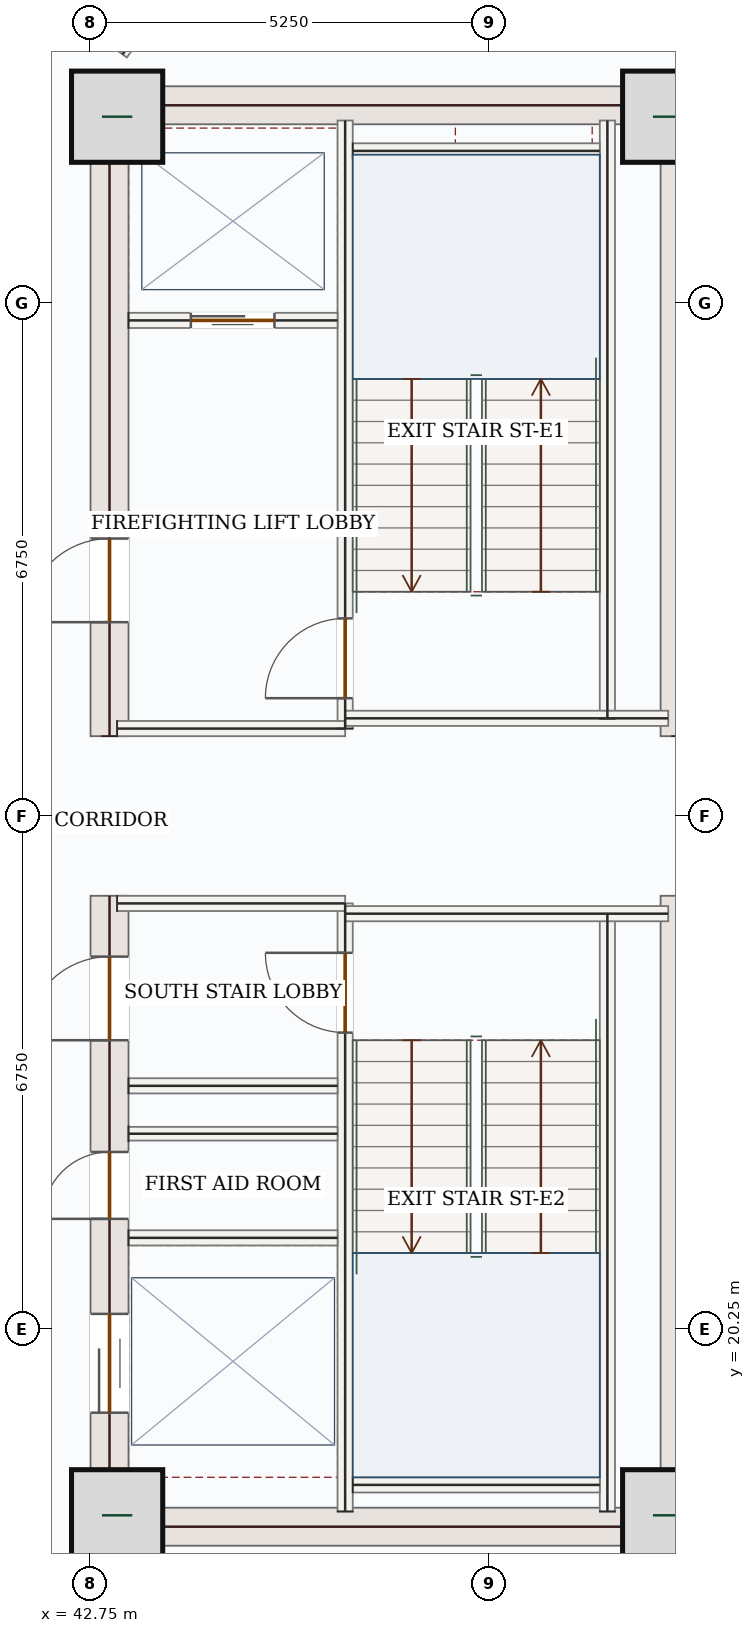
"""IFC4 building model, lengths in metres.
Left out: names, types, materials, properties, quantities, classifications, styles, units other than length and angle.
Written with IfcOpenShell. Run it as: python <this file> out.ifc"""

import sys

from ifc_helpers import new_model, si_unit, direction, frame, frame_2d, origin, origin_2d, place, context, subcontext, project, spatial, rectangle, extrude, source, transform, mapped, element, fill, save


model = new_model("IFC4")
c1 = context("Model", 3, precision=1e-05, world=origin(), true_north=direction((0.0, 1.0)))
c2 = subcontext(c1, "Body", "Model", "MODEL_VIEW")
j1 = project(units=[si_unit("LENGTHUNIT", "METRE"), si_unit("PLANEANGLEUNIT", "RADIAN")], contexts=[c1])
p1 = place(None, origin())
s1 = spatial("IfcSite", under=j1, at=p1, CompositionType="ELEMENT")
p2 = place(p1, origin())
s2 = spatial("IfcBuilding", under=s1, at=p2, CompositionType="ELEMENT")
p3 = place(p2, frame((0.0, 0.0, 143.4)))
s3 = spatial("IfcBuildingStorey", under=s2, at=p3, CompositionType="ELEMENT", Elevation=143.4)
p4 = place(p3, frame((43.0, 17.4, 0.0), z_axis=(0.0, 0.0, 1.0), x_axis=(0.0, 1.0, 0.0)))
e1 = element("IfcWall", 1, at=p4, inside=s3, PredefinedType="SHEAR", context=c2, shape_type="SweptSolid", body=[
    extrude(rectangle(XDim=8.55, YDim=0.5, at=frame_2d((4.275, 0.0))), origin(), (0.0, 0.0, 1.0), 3.62),
])
p5 = place(p4, frame((6.65, 0.0, 0.0)))
e2 = element("IfcOpeningElement", 2, at=p5, cuts=e1, PredefinedType="OPENING", context=c2, shape_type="SweptSolid", body=[
    extrude(rectangle(XDim=1.1, YDim=2.2, at=frame_2d((0.55, 1.1))), frame((0.0, 0.26, 0.0), z_axis=(0.0, -1.0, 0.0), x_axis=(1.0, 0.0, 0.0)), (0.0, 0.0, 1.0), 0.52),
])
p6 = place(p4, frame((1.75, 0.0, 0.0)))
e3 = element("IfcOpeningElement", 3, at=p6, cuts=e1, PredefinedType="OPENING", context=c2, shape_type="SweptSolid", body=[
    extrude(rectangle(XDim=1.3, YDim=2.2, at=frame_2d((0.65, 1.1))), frame((0.0, 0.26, 0.0), z_axis=(0.0, -1.0, 0.0), x_axis=(1.0, 0.0, 0.0)), (0.0, 0.0, 1.0), 0.52),
])
p7 = place(p4, frame((4.3, 0.0, 0.0)))
e4 = element("IfcOpeningElement", 4, at=p7, cuts=e1, PredefinedType="OPENING", context=c2, shape_type="SweptSolid", body=[
    extrude(rectangle(XDim=0.88, YDim=2.1, at=frame_2d((0.44, 1.05))), frame((0.0, 0.26, 0.0), z_axis=(0.0, -1.0, 0.0), x_axis=(1.0, 0.0, 0.0)), (0.0, 0.0, 1.0), 0.52),
])
p8 = place(p3, frame((43.0, 28.05, 0.0), z_axis=(0.0, 0.0, 1.0), x_axis=(0.0, 1.0, 0.0)))
e5 = element("IfcWall", 5, at=p8, inside=s3, PredefinedType="SHEAR", context=c2, shape_type="SweptSolid", body=[
    extrude(rectangle(XDim=8.55, YDim=0.5, at=frame_2d((4.275, 0.0))), origin(), (0.0, 0.0, 1.0), 3.62),
])
p9 = place(p8, frame((1.5, 0.0, 0.0)))
e6 = element("IfcOpeningElement", 6, at=p9, cuts=e5, PredefinedType="OPENING", context=c2, shape_type="SweptSolid", body=[
    extrude(rectangle(XDim=1.1, YDim=2.2, at=frame_2d((0.55, 1.1))), frame((0.0, 0.26, 0.0), z_axis=(0.0, -1.0, 0.0), x_axis=(1.0, 0.0, 0.0)), (0.0, 0.0, 1.0), 0.52),
])
m1 = source(origin(), c2, "Body", "SweptSolid", [
    extrude(rectangle(XDim=8.55, YDim=0.5, at=frame_2d((4.275, 0.0))), origin(), (0.0, 0.0, 1.0), 3.62),
])
for number, where, z_axis, x_axis in (
    (7, (50.5, 17.4, 0.0), (0.0, 0.0, 1.0), (0.0, 1.0, 0.0)),
    (8, (50.5, 28.05, 0.0), (0.0, 0.0, 1.0), (0.0, 1.0, 0.0)),
):
    element("IfcWall", number, at=place(p3, frame(where, z_axis=z_axis, x_axis=x_axis)), inside=s3, PredefinedType="SHEAR", context=c2, shape_type="MappedRepresentation", body=[
        mapped(m1, transform((0.0, 0.0, 0.0), x_axis=(1.0, 0.0, 0.0), y_axis=(0.0, 1.0, 0.0), z_axis=(0.0, 0.0, 1.0), scale=1.0)),
    ])
m2 = source(origin(), c2, "Body", "SweptSolid", [
    extrude(rectangle(XDim=7.0, YDim=0.5, at=frame_2d((3.5, 0.0))), origin(), (0.0, 0.0, 1.0), 3.62),
])
for number, where, z_axis, x_axis in (
    (9, (43.25, 17.65, 0.0), (0.0, 0.0, 1.0), (1.0, 0.0, 0.0)),
    (10, (43.25, 36.35, 0.0), (0.0, 0.0, 1.0), (1.0, 0.0, 0.0)),
):
    element("IfcWall", number, at=place(p3, frame(where, z_axis=z_axis, x_axis=x_axis)), inside=s3, PredefinedType="SHEAR", context=c2, shape_type="MappedRepresentation", body=[
        mapped(m2, transform((0.0, 0.0, 0.0), x_axis=(1.0, 0.0, 0.0), y_axis=(0.0, 1.0, 0.0), z_axis=(0.0, 0.0, 1.0), scale=1.0)),
    ])
m3 = source(origin(), c2, "Body", "SweptSolid", [
    extrude(rectangle(XDim=1.2, YDim=1.2, at=origin_2d()), origin(), (0.0, 0.0, 1.0), 3.9),
])
for number, where, z_axis, x_axis in (
    (11, (43.1, 17.8, 0.0), (0.0, 0.0, 1.0), (1.0, 0.0, 0.0)),
    (12, (50.35, 17.8, 0.0), (0.0, 0.0, 1.0), (1.0, 0.0, 0.0)),
    (13, (43.1, 36.2, 0.0), (0.0, 0.0, 1.0), (1.0, 0.0, 0.0)),
    (14, (50.35, 36.2, 0.0), (0.0, 0.0, 1.0), (1.0, 0.0, 0.0)),
):
    element("IfcColumn", number, at=place(p3, frame(where, z_axis=z_axis, x_axis=x_axis)), inside=s3, PredefinedType="COLUMN", context=c2, shape_type="MappedRepresentation", body=[
        mapped(m3, transform((0.0, 0.0, 0.0), x_axis=(1.0, 0.0, 0.0), y_axis=(0.0, 1.0, 0.0), z_axis=(0.0, 0.0, 1.0), scale=1.0)),
    ])
m4 = source(origin(), c2, "Body", "SweptSolid", [
    extrude(rectangle(XDim=5.258, YDim=0.28, at=frame_2d((2.629, 0.0))), origin(), (0.0, 0.0, 1.0), 3.62),
])
p10 = place(p3, frame((53.06, 18.458, 0.0), z_axis=(0.0, 0.0, 1.0), x_axis=(-0.707106781187, -0.707106781187, 0.0)))
e15 = element("IfcWall", 15, at=p10, inside=s3, PredefinedType="SOLIDWALL", context=c2, shape_type="MappedRepresentation", body=[
    mapped(m4, transform((0.0, 0.0, 0.0), x_axis=(1.0, 0.0, 0.0), y_axis=(0.0, 1.0, 0.0), z_axis=(0.0, 0.0, 1.0), scale=1.0)),
])
m5 = source(origin(), c2, "Body", "SweptSolid", [
    extrude(rectangle(XDim=3.967, YDim=0.28, at=frame_2d((1.984, 0.0))), origin(), (0.0, 0.0, 1.0), 3.62),
])
p11 = place(p3, frame((49.342, 39.26, 0.0), z_axis=(0.0, 0.0, 1.0), x_axis=(0.707076011326, -0.707137549708, 0.0)))
e16 = element("IfcWall", 16, at=p11, inside=s3, PredefinedType="SOLIDWALL", context=c2, shape_type="MappedRepresentation", body=[
    mapped(m5, transform((0.0, 0.0, 0.0), x_axis=(1.0, 0.0, 0.0), y_axis=(0.0, 1.0, 0.0), z_axis=(0.0, 0.0, 1.0), scale=1.0)),
])
m6 = source(origin(), c2, "Body", "SweptSolid", [
    extrude(rectangle(XDim=7.87, YDim=0.2, at=frame_2d((3.935, 0.0))), origin(), (0.0, 0.0, 1.0), 3.62),
])
for number, where, z_axis, x_axis in (
    (17, (49.55, 17.85, 0.0), (0.0, 0.0, 1.0), (0.0, 1.0, 0.0)),
    (18, (49.55, 28.28, 0.0), (0.0, 0.0, 1.0), (0.0, 1.0, 0.0)),
):
    element("IfcWall", number, at=place(p3, frame(where, z_axis=z_axis, x_axis=x_axis)), inside=s3, PredefinedType="SOLIDWALL", context=c2, shape_type="MappedRepresentation", body=[
        mapped(m6, transform((0.0, 0.0, 0.0), x_axis=(1.0, 0.0, 0.0), y_axis=(0.0, 1.0, 0.0), z_axis=(0.0, 0.0, 1.0), scale=1.0)),
    ])
p12 = place(p3, frame((46.1, 17.85, 0.0), z_axis=(0.0, 0.0, 1.0), x_axis=(0.0, 1.0, 0.0)))
e19 = element("IfcWall", 19, at=p12, inside=s3, PredefinedType="SOLIDWALL", context=c2, shape_type="SweptSolid", body=[
    extrude(rectangle(XDim=8.0, YDim=0.2, at=frame_2d((4.0, 0.0))), origin(), (0.0, 0.0, 1.0), 3.62),
])
p13 = place(p12, frame((6.3, 0.0, 0.0)))
e20 = element("IfcOpeningElement", 20, at=p13, cuts=e19, PredefinedType="OPENING", context=c2, shape_type="SweptSolid", body=[
    extrude(rectangle(XDim=1.05, YDim=2.15, at=frame_2d((0.525, 1.075))), frame((0.0, 0.11, 0.0), z_axis=(0.0, -1.0, 0.0), x_axis=(1.0, 0.0, 0.0)), (0.0, 0.0, 1.0), 0.22),
])
p14 = place(p3, frame((46.1, 28.15, 0.0), z_axis=(0.0, 0.0, 1.0), x_axis=(0.0, 1.0, 0.0)))
e21 = element("IfcWall", 21, at=p14, inside=s3, PredefinedType="SOLIDWALL", context=c2, shape_type="SweptSolid", body=[
    extrude(rectangle(XDim=8.0, YDim=0.2, at=frame_2d((4.0, 0.0))), origin(), (0.0, 0.0, 1.0), 3.62),
])
p15 = place(p14, frame((0.4, 0.0, 0.0)))
e22 = element("IfcOpeningElement", 22, at=p15, cuts=e21, PredefinedType="OPENING", context=c2, shape_type="SweptSolid", body=[
    extrude(rectangle(XDim=1.05, YDim=2.15, at=frame_2d((0.525, 1.075))), frame((0.0, 0.11, 0.0), z_axis=(0.0, -1.0, 0.0), x_axis=(1.0, 0.0, 0.0)), (0.0, 0.0, 1.0), 0.22),
])
m7 = source(origin(), c2, "Body", "SweptSolid", [
    extrude(rectangle(XDim=3.0, YDim=0.2, at=frame_2d((1.5, 0.0))), origin(), (0.0, 0.0, 1.0), 3.62),
])
p16 = place(p3, frame((43.1, 25.85, 0.0), z_axis=(0.0, 0.0, 1.0), x_axis=(1.0, 0.0, 0.0)))
e23 = element("IfcWall", 23, at=p16, inside=s3, PredefinedType="SOLIDWALL", context=c2, shape_type="MappedRepresentation", body=[
    mapped(m7, transform((0.0, 0.0, 0.0), x_axis=(1.0, 0.0, 0.0), y_axis=(0.0, 1.0, 0.0), z_axis=(0.0, 0.0, 1.0), scale=1.0)),
])
m8 = source(origin(), c2, "Body", "SweptSolid", [
    extrude(rectangle(XDim=4.25, YDim=0.2, at=frame_2d((2.125, 0.0))), origin(), (0.0, 0.0, 1.0), 3.62),
])
p17 = place(p3, frame((46.1, 25.715, 0.0), z_axis=(0.0, 0.0, 1.0), x_axis=(1.0, 0.0, 0.0)))
e24 = element("IfcWall", 24, at=p17, inside=s3, PredefinedType="SOLIDWALL", context=c2, shape_type="MappedRepresentation", body=[
    mapped(m8, transform((0.0, 0.0, 0.0), x_axis=(1.0, 0.0, 0.0), y_axis=(0.0, 1.0, 0.0), z_axis=(0.0, 0.0, 1.0), scale=1.0)),
])
p18 = place(p3, frame((43.1, 28.15, 0.0), z_axis=(0.0, 0.0, 1.0), x_axis=(1.0, 0.0, 0.0)))
e25 = element("IfcWall", 25, at=p18, inside=s3, PredefinedType="SOLIDWALL", context=c2, shape_type="MappedRepresentation", body=[
    mapped(m7, transform((0.0, 0.0, 0.0), x_axis=(1.0, 0.0, 0.0), y_axis=(0.0, 1.0, 0.0), z_axis=(0.0, 0.0, 1.0), scale=1.0)),
])
p19 = place(p3, frame((46.1, 28.285, 0.0), z_axis=(0.0, 0.0, 1.0), x_axis=(1.0, 0.0, 0.0)))
e26 = element("IfcWall", 26, at=p19, inside=s3, PredefinedType="SOLIDWALL", context=c2, shape_type="MappedRepresentation", body=[
    mapped(m8, transform((0.0, 0.0, 0.0), x_axis=(1.0, 0.0, 0.0), y_axis=(0.0, 1.0, 0.0), z_axis=(0.0, 0.0, 1.0), scale=1.0)),
])
m9 = source(origin(), c2, "Body", "SweptSolid", [
    extrude(rectangle(XDim=3.25, YDim=0.2, at=frame_2d((1.625, 0.0))), origin(), (0.0, 0.0, 1.0), 3.62),
])
for number, where, z_axis, x_axis in (
    (27, (46.2, 35.75, 0.0), (0.0, 0.0, 1.0), (1.0, 0.0, 0.0)),
    (28, (46.2, 18.2, 0.0), (0.0, 0.0, 1.0), (1.0, 0.0, 0.0)),
):
    element("IfcWall", number, at=place(p3, frame(where, z_axis=z_axis, x_axis=x_axis)), inside=s3, PredefinedType="SOLIDWALL", context=c2, shape_type="MappedRepresentation", body=[
        mapped(m9, transform((0.0, 0.0, 0.0), x_axis=(1.0, 0.0, 0.0), y_axis=(0.0, 1.0, 0.0), z_axis=(0.0, 0.0, 1.0), scale=1.0)),
    ])
p20 = place(p3, frame((43.25, 33.52, 0.0), z_axis=(0.0, 0.0, 1.0), x_axis=(1.0, 0.0, 0.0)))
e29 = element("IfcWall", 29, at=p20, inside=s3, PredefinedType="SOLIDWALL", context=c2, shape_type="SweptSolid", body=[
    extrude(rectangle(XDim=2.75, YDim=0.2, at=frame_2d((1.375, 0.0))), origin(), (0.0, 0.0, 1.0), 3.62),
])
p21 = place(p20, frame((0.82, 0.0, 0.0)))
e30 = element("IfcOpeningElement", 30, at=p21, cuts=e29, PredefinedType="OPENING", context=c2, shape_type="SweptSolid", body=[
    extrude(rectangle(XDim=1.1, YDim=2.15, at=frame_2d((0.55, 1.075))), frame((0.0, 0.11, 0.0), z_axis=(0.0, -1.0, 0.0), x_axis=(1.0, 0.0, 0.0)), (0.0, 0.0, 1.0), 0.22),
])
m10 = source(origin(), c2, "Body", "SweptSolid", [
    extrude(rectangle(XDim=2.75, YDim=0.2, at=frame_2d((1.375, 0.0))), origin(), (0.0, 0.0, 1.0), 3.62),
])
for number, where, z_axis, x_axis in (
    (31, (43.25, 23.45, 0.0), (0.0, 0.0, 1.0), (1.0, 0.0, 0.0)),
    (32, (43.25, 21.45, 0.0), (0.0, 0.0, 1.0), (1.0, 0.0, 0.0)),
):
    element("IfcWall", number, at=place(p3, frame(where, z_axis=z_axis, x_axis=x_axis)), inside=s3, PredefinedType="SOLIDWALL", context=c2, shape_type="MappedRepresentation", body=[
        mapped(m10, transform((0.0, 0.0, 0.0), x_axis=(1.0, 0.0, 0.0), y_axis=(0.0, 1.0, 0.0), z_axis=(0.0, 0.0, 1.0), scale=1.0)),
    ])
m11 = source(origin(), c2, "Body", "SweptSolid", [
    extrude(rectangle(XDim=2.75, YDim=0.18, at=frame_2d((1.375, 0.0))), origin(), (0.0, 0.0, 1.0), 3.62),
])
p22 = place(p3, frame((43.25, 22.82, 0.0), z_axis=(0.0, 0.0, 1.0), x_axis=(1.0, 0.0, 0.0)))
e33 = element("IfcWall", 33, at=p22, inside=s3, PredefinedType="PARTITIONING", context=c2, shape_type="MappedRepresentation", body=[
    mapped(m11, transform((0.0, 0.0, 0.0), x_axis=(1.0, 0.0, 0.0), y_axis=(0.0, 1.0, 0.0), z_axis=(0.0, 0.0, 1.0), scale=1.0)),
])
m12 = source(origin(), c2, "Body", "SweptSolid", [
    extrude(rectangle(XDim=2.582, YDim=0.14, at=frame_2d((1.291, 0.0))), origin(), (0.0, 0.0, 1.0), 3.62),
])
p23 = place(p3, frame((44.68, 39.115, 0.0), z_axis=(0.0, 0.0, 1.0), x_axis=(-0.584533864389, -0.811369312572, 0.0)))
e34 = element("IfcWall", 34, at=p23, inside=s3, PredefinedType="PARTITIONING", context=c2, shape_type="MappedRepresentation", body=[
    mapped(m12, transform((0.0, 0.0, 0.0), x_axis=(1.0, 0.0, 0.0), y_axis=(0.0, 1.0, 0.0), z_axis=(0.0, 0.0, 1.0), scale=1.0)),
])
m13 = source(origin(), c2, "Body", "SweptSolid", [
    extrude(rectangle(XDim=1.05, YDim=2.15, at=frame_2d((0.525, 1.075))), frame((0.0, 0.025, 0.0), z_axis=(0.0, -1.0, 0.0), x_axis=(1.0, 0.0, 0.0)), (0.0, 0.0, 1.0), 0.05),
])
p24 = place(p15, origin())
e35 = element("IfcDoor", 35, at=p24, inside=s3, OperationType="SINGLE_SWING_LEFT", PredefinedType="DOOR", context=c2, shape_type="MappedRepresentation", body=[
    mapped(m13, transform((0.0, 0.0, 0.0), x_axis=(1.0, 0.0, 0.0), y_axis=(0.0, 1.0, 0.0), z_axis=(0.0, 0.0, 1.0), scale=1.0)),
])
fill(e22, e35)
p25 = place(p13, origin())
e36 = element("IfcDoor", 36, at=p25, inside=s3, OperationType="SINGLE_SWING_RIGHT", PredefinedType="DOOR", context=c2, shape_type="MappedRepresentation", body=[
    mapped(m13, transform((0.0, 0.0, 0.0), x_axis=(1.0, 0.0, 0.0), y_axis=(0.0, 1.0, 0.0), z_axis=(0.0, 0.0, 1.0), scale=1.0)),
])
fill(e20, e36)
m14 = source(origin(), c2, "Body", "SweptSolid", [
    extrude(rectangle(XDim=1.1, YDim=2.15, at=frame_2d((0.55, 1.075))), frame((0.0, 0.025, 0.0), z_axis=(0.0, -1.0, 0.0), x_axis=(1.0, 0.0, 0.0)), (0.0, 0.0, 1.0), 0.05),
])
p26 = place(p21, origin())
e37 = element("IfcDoor", 37, at=p26, inside=s3, OperationType="DOUBLE_DOOR_SLIDING", PredefinedType="DOOR", context=c2, shape_type="MappedRepresentation", body=[
    mapped(m14, transform((0.0, 0.0, 0.0), x_axis=(1.0, 0.0, 0.0), y_axis=(0.0, 1.0, 0.0), z_axis=(0.0, 0.0, 1.0), scale=1.0)),
])
fill(e30, e37)
m15 = source(origin(), c2, "Body", "SweptSolid", [
    extrude(rectangle(XDim=1.1, YDim=2.2, at=frame_2d((0.55, 1.1))), frame((0.0, 0.025, 0.0), z_axis=(0.0, -1.0, 0.0), x_axis=(1.0, 0.0, 0.0)), (0.0, 0.0, 1.0), 0.05),
])
p27 = place(p9, origin())
e38 = element("IfcDoor", 38, at=p27, inside=s3, OperationType="SINGLE_SWING_LEFT", PredefinedType="DOOR", context=c2, shape_type="MappedRepresentation", body=[
    mapped(m15, transform((0.0, 0.0, 0.0), x_axis=(1.0, 0.0, 0.0), y_axis=(0.0, 1.0, 0.0), z_axis=(0.0, 0.0, 1.0), scale=1.0)),
])
fill(e6, e38)
p28 = place(p5, origin())
e39 = element("IfcDoor", 39, at=p28, inside=s3, OperationType="SINGLE_SWING_LEFT", PredefinedType="DOOR", context=c2, shape_type="MappedRepresentation", body=[
    mapped(m15, transform((0.0, 0.0, 0.0), x_axis=(1.0, 0.0, 0.0), y_axis=(0.0, 1.0, 0.0), z_axis=(0.0, 0.0, 1.0), scale=1.0)),
])
fill(e2, e39)
m16 = source(origin(), c2, "Body", "SweptSolid", [
    extrude(rectangle(XDim=1.3, YDim=2.2, at=frame_2d((0.65, 1.1))), frame((0.0, 0.025, 0.0), z_axis=(0.0, -1.0, 0.0), x_axis=(1.0, 0.0, 0.0)), (0.0, 0.0, 1.0), 0.05),
])
p29 = place(p6, origin())
e40 = element("IfcDoor", 40, at=p29, inside=s3, OperationType="DOUBLE_DOOR_SLIDING", PredefinedType="DOOR", context=c2, shape_type="MappedRepresentation", body=[
    mapped(m16, transform((0.0, 0.0, 0.0), x_axis=(1.0, 0.0, 0.0), y_axis=(0.0, 1.0, 0.0), z_axis=(0.0, 0.0, 1.0), scale=1.0)),
])
fill(e3, e40)
m17 = source(origin(), c2, "Body", "SweptSolid", [
    extrude(rectangle(XDim=0.88, YDim=2.1, at=frame_2d((0.44, 1.05))), frame((0.0, 0.025, 0.0), z_axis=(0.0, -1.0, 0.0), x_axis=(1.0, 0.0, 0.0)), (0.0, 0.0, 1.0), 0.05),
])
p30 = place(p7, origin())
e41 = element("IfcDoor", 41, at=p30, inside=s3, OperationType="SINGLE_SWING_LEFT", PredefinedType="DOOR", context=c2, shape_type="MappedRepresentation", body=[
    mapped(m17, transform((0.0, 0.0, 0.0), x_axis=(1.0, 0.0, 0.0), y_axis=(0.0, 1.0, 0.0), z_axis=(0.0, 0.0, 1.0), scale=1.0)),
])
fill(e4, e41)
save(model, sys.argv[1])
